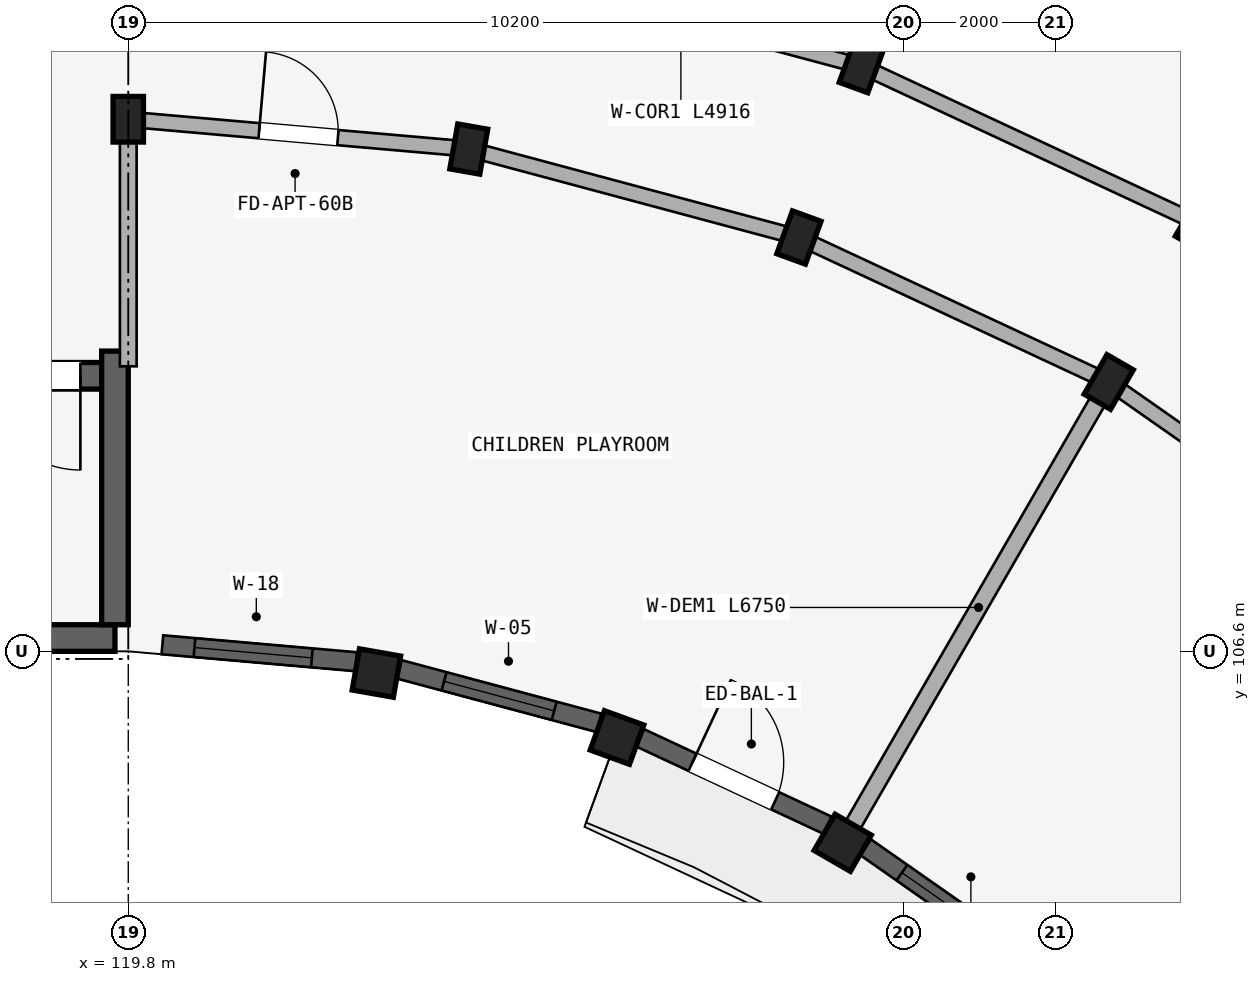
"""IFC4 building model, lengths in metres.
Left out: names, types, materials, properties, quantities, classifications, styles, units other than length and angle.
Written with IfcOpenShell. Run it as: python <this file> out.ifc"""

import sys

from ifc_helpers import new_model, si_unit, direction, frame, frame_2d, origin, origin_2d, place, context, subcontext, project, spatial, rectangle, extrude, element, fill, save


model = new_model("IFC4")
c1 = context("Model", 3, precision=1e-05, world=origin(), true_north=direction((0.0, 1.0)))
c2 = subcontext(c1, "Body", "Model", "MODEL_VIEW")
j1 = project(units=[si_unit("LENGTHUNIT", "METRE"), si_unit("PLANEANGLEUNIT", "RADIAN")], contexts=[c1])
p1 = place(None, origin())
s1 = spatial("IfcSite", under=j1, at=p1, CompositionType="ELEMENT")
p2 = place(p1, origin())
s2 = spatial("IfcBuilding", under=s1, at=p2, CompositionType="ELEMENT")
p3 = place(p2, frame((0.0, 0.0, 40.2)))
s3 = spatial("IfcBuildingStorey", under=s2, at=p3, CompositionType="ELEMENT", Elevation=40.2)
p4 = place(p3, frame((119.625, 106.775, 0.0), z_axis=(0.0, 0.0, 1.0), x_axis=(-1.0, 0.0, 0.0)))
e1 = element("IfcWall", 1, at=p4, inside=s3, PredefinedType="SHEAR", context=c2, shape_type="SweptSolid", body=[
    extrude(rectangle(XDim=8.25, YDim=0.35, at=frame_2d((4.125, 0.0))), origin(), (0.0, 0.0, 1.0), 2.91),
])
p5 = place(p3, frame((119.45, 110.225, 0.0), z_axis=(0.0, 0.0, 1.0), x_axis=(-1.0, 0.0, 0.0)))
e2 = element("IfcWall", 2, at=p5, inside=s3, PredefinedType="SHEAR", context=c2, shape_type="SweptSolid", body=[
    extrude(rectangle(XDim=7.9, YDim=0.35, at=frame_2d((3.95, 0.0))), origin(), (0.0, 0.0, 1.0), 2.91),
])
p6 = place(p5, frame((0.28, 0.0, 0.0)))
e3 = element("IfcOpeningElement", 3, at=p6, cuts=e2, PredefinedType="OPENING", context=c2, shape_type="SweptSolid", body=[
    extrude(rectangle(XDim=1.24, YDim=2.15, at=frame_2d((0.62, 1.075))), frame((0.0, 0.185, 0.0), z_axis=(0.0, -1.0, 0.0), x_axis=(1.0, 0.0, 0.0)), (0.0, 0.0, 1.0), 0.37),
])
p7 = place(p3, frame((119.625, 106.95, 0.0), z_axis=(0.0, 0.0, 1.0), x_axis=(0.0, 1.0, 0.0)))
e4 = element("IfcWall", 4, at=p7, inside=s3, PredefinedType="SHEAR", context=c2, shape_type="SweptSolid", body=[
    extrude(rectangle(XDim=3.6, YDim=0.35, at=frame_2d((1.8, 0.0))), origin(), (0.0, 0.0, 1.0), 2.91),
])
p8 = place(p3, frame((119.8, 113.6, 0.0), z_axis=(0.0, 0.0, 1.0), x_axis=(1.0, 0.0, 0.0)))
e5 = element("IfcColumn", 5, at=p8, inside=s3, PredefinedType="COLUMN", context=c2, shape_type="SweptSolid", body=[
    extrude(rectangle(XDim=0.4, YDim=0.6, at=origin_2d()), origin(), (0.0, 0.0, 1.0), 2.91),
])
p9 = place(p3, frame((123.065, 106.314, 0.0), z_axis=(0.0, 0.0, 1.0), x_axis=(-0.984807753012, 0.173648177667, 0.0)))
e6 = element("IfcColumn", 6, at=p9, inside=s3, PredefinedType="COLUMN", context=c2, shape_type="SweptSolid", body=[
    extrude(rectangle(XDim=0.55, YDim=0.55, at=origin_2d()), origin(), (0.0, 0.0, 1.0), 2.91),
])
p10 = place(p3, frame((124.28, 113.208, 0.0), z_axis=(0.0, 0.0, 1.0), x_axis=(-0.984807753012, 0.173648177667, 0.0)))
e7 = element("IfcColumn", 7, at=p10, inside=s3, PredefinedType="COLUMN", context=c2, shape_type="SweptSolid", body=[
    extrude(rectangle(XDim=0.4, YDim=0.6, at=origin_2d()), origin(), (0.0, 0.0, 1.0), 2.91),
])
p11 = place(p3, frame((126.23, 105.466, 0.0), z_axis=(0.0, 0.0, 1.0), x_axis=(-0.939692620786, 0.342020143326, 0.0)))
e8 = element("IfcColumn", 8, at=p11, inside=s3, PredefinedType="COLUMN", context=c2, shape_type="SweptSolid", body=[
    extrude(rectangle(XDim=0.55, YDim=0.55, at=origin_2d()), origin(), (0.0, 0.0, 1.0), 2.91),
])
for number, where, z_axis, x_axis in (
    (9, (128.624, 112.044, 0.0), (0.0, 0.0, 1.0), (-0.94, 0.342, 0.0)),
    (10, (129.445, 114.299, 0.0), (0.0, 0.0, 1.0), (-0.94, 0.342, 0.0)),
):
    element("IfcColumn", number, at=place(p3, frame(where, z_axis=z_axis, x_axis=x_axis)), inside=s3, PredefinedType="COLUMN", context=c2, shape_type="SweptSolid", body=[
        extrude(rectangle(XDim=0.4, YDim=0.6, at=origin_2d()), origin(), (0.0, 0.0, 1.0), 2.91),
    ])
p12 = place(p3, frame((129.2, 104.081, 0.0), z_axis=(0.0, 0.0, 1.0), x_axis=(-0.866025403784, 0.5, 0.0)))
e11 = element("IfcColumn", 11, at=p12, inside=s3, PredefinedType="COLUMN", context=c2, shape_type="SweptSolid", body=[
    extrude(rectangle(XDim=0.55, YDim=0.55, at=origin_2d()), origin(), (0.0, 0.0, 1.0), 2.91),
])
for number, where, z_axis, x_axis in (
    (12, (132.7, 110.144, 0.0), (0.0, 0.0, 1.0), (-0.866, 0.5, 0.0)),
    (13, (133.9, 112.222, 0.0), (0.0, 0.0, 1.0), (-0.866, 0.5, 0.0)),
):
    element("IfcColumn", number, at=place(p3, frame(where, z_axis=z_axis, x_axis=x_axis)), inside=s3, PredefinedType="COLUMN", context=c2, shape_type="SweptSolid", body=[
        extrude(rectangle(XDim=0.4, YDim=0.6, at=origin_2d()), origin(), (0.0, 0.0, 1.0), 2.91),
    ])
p13 = place(p3, frame((119.8, 113.6, 0.0), z_axis=(0.0, 0.0, 1.0), x_axis=(0.996191949488, -0.087187153726, 0.0)))
e14 = element("IfcWall", 14, at=p13, inside=s3, PredefinedType="STANDARD", context=c2, shape_type="SweptSolid", body=[
    extrude(rectangle(XDim=4.497, YDim=0.2, at=frame_2d((2.249, 0.0))), origin(), (0.0, 0.0, 1.0), 2.352),
])
p14 = place(p13, frame((1.729, 0.0, 0.0)))
e15 = element("IfcOpeningElement", 15, at=p14, cuts=e14, PredefinedType="OPENING", context=c2, shape_type="SweptSolid", body=[
    extrude(rectangle(XDim=1.04, YDim=2.15, at=frame_2d((0.52, 1.075))), frame((0.0, 0.11, 0.0), z_axis=(0.0, -1.0, 0.0), x_axis=(1.0, 0.0, 0.0)), (0.0, 0.0, 1.0), 0.22),
])
p15 = place(p3, frame((124.28, 113.208, 0.0), z_axis=(0.0, 0.0, 1.0), x_axis=(0.965934240054, -0.258787642463, 0.0)))
e16 = element("IfcWall", 16, at=p15, inside=s3, PredefinedType="STANDARD", context=c2, shape_type="SweptSolid", body=[
    extrude(rectangle(XDim=4.497, YDim=0.2, at=frame_2d((2.249, 0.0))), origin(), (0.0, 0.0, 1.0), 2.352),
])
p16 = place(p3, frame((124.697, 115.572, 0.0), z_axis=(0.0, 0.0, 1.0), x_axis=(0.965930095386, -0.258803112091, 0.0)))
e17 = element("IfcWall", 17, at=p16, inside=s3, PredefinedType="STANDARD", context=c2, shape_type="SweptSolid", body=[
    extrude(rectangle(XDim=4.916, YDim=0.2, at=frame_2d((2.458, 0.0))), origin(), (0.0, 0.0, 1.0), 2.352),
])
p17 = place(p3, frame((128.624, 112.044, 0.0), z_axis=(0.0, 0.0, 1.0), x_axis=(0.906307919131, -0.422617978463, 0.0)))
e18 = element("IfcWall", 18, at=p17, inside=s3, PredefinedType="STANDARD", context=c2, shape_type="SweptSolid", body=[
    extrude(rectangle(XDim=4.497, YDim=0.2, at=frame_2d((2.249, 0.0))), origin(), (0.0, 0.0, 1.0), 2.352),
])
p18 = place(p3, frame((129.445, 114.299, 0.0), z_axis=(0.0, 0.0, 1.0), x_axis=(0.906302381024, -0.422629854778, 0.0)))
e19 = element("IfcWall", 19, at=p18, inside=s3, PredefinedType="STANDARD", context=c2, shape_type="SweptSolid", body=[
    extrude(rectangle(XDim=4.915, YDim=0.2, at=frame_2d((2.458, 0.0))), origin(), (0.0, 0.0, 1.0), 2.352),
])
p19 = place(p3, frame((132.7, 110.144, 0.0), z_axis=(0.0, 0.0, 1.0), x_axis=(0.819155404658, -0.573571637217, 0.0)))
e20 = element("IfcWall", 20, at=p19, inside=s3, PredefinedType="STANDARD", context=c2, shape_type="SweptSolid", body=[
    extrude(rectangle(XDim=4.497, YDim=0.2, at=frame_2d((2.249, 0.0))), origin(), (0.0, 0.0, 1.0), 2.352),
])
p20 = place(p19, frame((1.709, 0.0, 0.0)))
e21 = element("IfcOpeningElement", 21, at=p20, cuts=e20, PredefinedType="OPENING", context=c2, shape_type="SweptSolid", body=[
    extrude(rectangle(XDim=1.08, YDim=2.15, at=frame_2d((0.54, 1.075))), frame((0.0, 0.11, 0.0), z_axis=(0.0, -1.0, 0.0), x_axis=(1.0, 0.0, 0.0)), (0.0, 0.0, 1.0), 0.22),
])
p21 = place(p3, frame((119.8, 110.35, 0.0), z_axis=(0.0, 0.0, 1.0), x_axis=(0.0, 1.0, 0.0)))
e22 = element("IfcWall", 22, at=p21, inside=s3, PredefinedType="STANDARD", context=c2, shape_type="SweptSolid", body=[
    extrude(rectangle(XDim=3.2, YDim=0.22, at=frame_2d((1.6, 0.0))), origin(), (0.0, 0.0, 1.0), 2.352),
])
p22 = place(p3, frame((129.479, 114.393, 0.0), z_axis=(0.0, 0.0, 1.0), x_axis=(0.341992021352, 0.939702855871, 0.0)))
e23 = element("IfcWall", 23, at=p22, inside=s3, PredefinedType="PARTITIONING", context=c2, shape_type="SweptSolid", body=[
    extrude(rectangle(XDim=6.22, YDim=0.125, at=frame_2d((3.11, 0.0))), origin(), (0.0, 0.0, 1.0), 2.352),
])
p23 = place(p22, frame((4.45, 0.0, 0.0)))
e24 = element("IfcOpeningElement", 24, at=p23, cuts=e23, PredefinedType="OPENING", context=c2, shape_type="SweptSolid", body=[
    extrude(rectangle(XDim=0.8, YDim=2.1, at=frame_2d((0.4, 1.05))), frame((0.0, 0.073, 0.0), z_axis=(0.0, -1.0, 0.0), x_axis=(1.0, 0.0, 0.0)), (0.0, 0.0, 1.0), 0.145),
])
p24 = place(p3, frame((129.3, 104.254, 0.0), z_axis=(0.0, 0.0, 1.0), x_axis=(0.499997969693, 0.866026575979, 0.0)))
e25 = element("IfcWall", 25, at=p24, inside=s3, PredefinedType="STANDARD", context=c2, shape_type="SweptSolid", body=[
    extrude(rectangle(XDim=6.75, YDim=0.22, at=frame_2d((3.375, 0.0))), origin(), (0.0, 0.0, 1.0), 2.352),
])
p25 = place(p3, frame((120.249, 106.686, 0.0), z_axis=(0.0, 0.0, 1.0), x_axis=(0.996188847542, -0.087222589008, 0.0)))
e26 = element("IfcWall", 26, at=p25, inside=s3, PredefinedType="STANDARD", context=c2, shape_type="SweptSolid", body=[
    extrude(rectangle(XDim=2.558, YDim=0.25, at=frame_2d((1.279, 0.0))), origin(), (0.0, 0.0, 1.0), 2.452),
])
p26 = place(p25, frame((0.424, 0.0, 0.652)))
e27 = element("IfcOpeningElement", 27, at=p26, cuts=e26, PredefinedType="OPENING", context=c2, shape_type="SweptSolid", body=[
    extrude(rectangle(XDim=1.55, YDim=1.6, at=frame_2d((0.775, 0.8))), frame((0.0, 0.135, 0.0), z_axis=(0.0, -1.0, 0.0), x_axis=(1.0, 0.0, 0.0)), (0.0, 0.0, 1.0), 0.27),
])
p27 = place(p3, frame((123.366, 106.363, 0.0), z_axis=(0.0, 0.0, 1.0), x_axis=(0.965928818058, -0.258807879411, 0.0)))
e28 = element("IfcWall", 28, at=p27, inside=s3, PredefinedType="STANDARD", context=c2, shape_type="SweptSolid", body=[
    extrude(rectangle(XDim=2.72, YDim=0.25, at=frame_2d((1.36, 0.0))), origin(), (0.0, 0.0, 1.0), 2.452),
])
p28 = place(p27, frame((0.61, 0.0, 0.602)))
e29 = element("IfcOpeningElement", 29, at=p28, cuts=e28, PredefinedType="OPENING", context=c2, shape_type="SweptSolid", body=[
    extrude(rectangle(XDim=1.5, YDim=1.65, at=frame_2d((0.75, 0.825))), frame((0.0, 0.135, 0.0), z_axis=(0.0, -1.0, 0.0), x_axis=(1.0, 0.0, 0.0)), (0.0, 0.0, 1.0), 0.27),
])
p29 = place(p3, frame((126.535, 105.462, 0.0), z_axis=(0.0, 0.0, 1.0), x_axis=(0.906302358412, -0.422629903269, 0.0)))
e30 = element("IfcWall", 30, at=p29, inside=s3, PredefinedType="STANDARD", context=c2, shape_type="SweptSolid", body=[
    extrude(rectangle(XDim=2.72, YDim=0.25, at=frame_2d((1.36, 0.0))), origin(), (0.0, 0.0, 1.0), 2.452),
])
p30 = place(p29, frame((0.76, 0.0, 0.0)))
e31 = element("IfcOpeningElement", 31, at=p30, cuts=e30, PredefinedType="OPENING", context=c2, shape_type="SweptSolid", body=[
    extrude(rectangle(XDim=1.2, YDim=2.15, at=frame_2d((0.6, 1.075))), frame((0.0, 0.135, 0.0), z_axis=(0.0, -1.0, 0.0), x_axis=(1.0, 0.0, 0.0)), (0.0, 0.0, 1.0), 0.27),
])
p31 = place(p3, frame((129.5, 104.024, 0.0), z_axis=(0.0, 0.0, 1.0), x_axis=(0.819126475299, -0.573612950921, 0.0)))
e32 = element("IfcWall", 32, at=p31, inside=s3, PredefinedType="STANDARD", context=c2, shape_type="SweptSolid", body=[
    extrude(rectangle(XDim=2.72, YDim=0.25, at=frame_2d((1.36, 0.0))), origin(), (0.0, 0.0, 1.0), 2.452),
])
p32 = place(p31, frame((0.585, 0.0, 0.652)))
e33 = element("IfcOpeningElement", 33, at=p32, cuts=e32, PredefinedType="OPENING", context=c2, shape_type="SweptSolid", body=[
    extrude(rectangle(XDim=1.55, YDim=1.6, at=frame_2d((0.775, 0.8))), frame((0.0, 0.135, 0.0), z_axis=(0.0, -1.0, 0.0), x_axis=(1.0, 0.0, 0.0)), (0.0, 0.0, 1.0), 0.27),
])
p33 = place(p26, origin())
e34 = element("IfcWindow", 34, at=p33, inside=s3, PartitioningType="DOUBLE_PANEL_VERTICAL", PredefinedType="WINDOW", context=c2, shape_type="SweptSolid", body=[
    extrude(rectangle(XDim=1.55, YDim=1.6, at=frame_2d((0.775, 0.8))), frame((0.0, 0.03, 0.0), z_axis=(0.0, -1.0, 0.0), x_axis=(1.0, 0.0, 0.0)), (0.0, 0.0, 1.0), 0.06),
])
fill(e27, e34)
p34 = place(p28, origin())
e35 = element("IfcWindow", 35, at=p34, inside=s3, PartitioningType="DOUBLE_PANEL_VERTICAL", PredefinedType="WINDOW", context=c2, shape_type="SweptSolid", body=[
    extrude(rectangle(XDim=1.5, YDim=1.65, at=frame_2d((0.75, 0.825))), frame((0.0, 0.03, 0.0), z_axis=(0.0, -1.0, 0.0), x_axis=(1.0, 0.0, 0.0)), (0.0, 0.0, 1.0), 0.06),
])
fill(e29, e35)
p35 = place(p32, origin())
e36 = element("IfcWindow", 36, at=p35, inside=s3, PartitioningType="DOUBLE_PANEL_VERTICAL", PredefinedType="WINDOW", context=c2, shape_type="SweptSolid", body=[
    extrude(rectangle(XDim=1.55, YDim=1.6, at=frame_2d((0.775, 0.8))), frame((0.0, 0.03, 0.0), z_axis=(0.0, -1.0, 0.0), x_axis=(1.0, 0.0, 0.0)), (0.0, 0.0, 1.0), 0.06),
])
fill(e33, e36)
p36 = place(p6, origin())
e37 = element("IfcDoor", 37, at=p36, inside=s3, OperationType="SINGLE_SWING_LEFT", PredefinedType="DOOR", context=c2, shape_type="SweptSolid", body=[
    extrude(rectangle(XDim=1.24, YDim=2.15, at=frame_2d((0.62, 1.075))), frame((0.0, 0.025, 0.0), z_axis=(0.0, -1.0, 0.0), x_axis=(1.0, 0.0, 0.0)), (0.0, 0.0, 1.0), 0.05),
])
fill(e3, e37)
p37 = place(p14, origin())
e38 = element("IfcDoor", 38, at=p37, inside=s3, OperationType="SINGLE_SWING_LEFT", PredefinedType="DOOR", context=c2, shape_type="SweptSolid", body=[
    extrude(rectangle(XDim=1.04, YDim=2.15, at=frame_2d((0.52, 1.075))), frame((0.0, 0.025, 0.0), z_axis=(0.0, -1.0, 0.0), x_axis=(1.0, 0.0, 0.0)), (0.0, 0.0, 1.0), 0.05),
])
fill(e15, e38)
p38 = place(p30, frame((1.2, 0.0, 0.0), z_axis=(0.0, 0.0, 1.0), x_axis=(-1.0, 0.0, 0.0)))
e39 = element("IfcDoor", 39, at=p38, inside=s3, OperationType="SINGLE_SWING_RIGHT", PredefinedType="DOOR", context=c2, shape_type="SweptSolid", body=[
    extrude(rectangle(XDim=1.2, YDim=2.15, at=frame_2d((0.6, 1.075))), frame((0.0, 0.025, 0.0), z_axis=(0.0, -1.0, 0.0), x_axis=(1.0, 0.0, 0.0)), (0.0, 0.0, 1.0), 0.05),
])
fill(e31, e39)
save(model, sys.argv[1])
